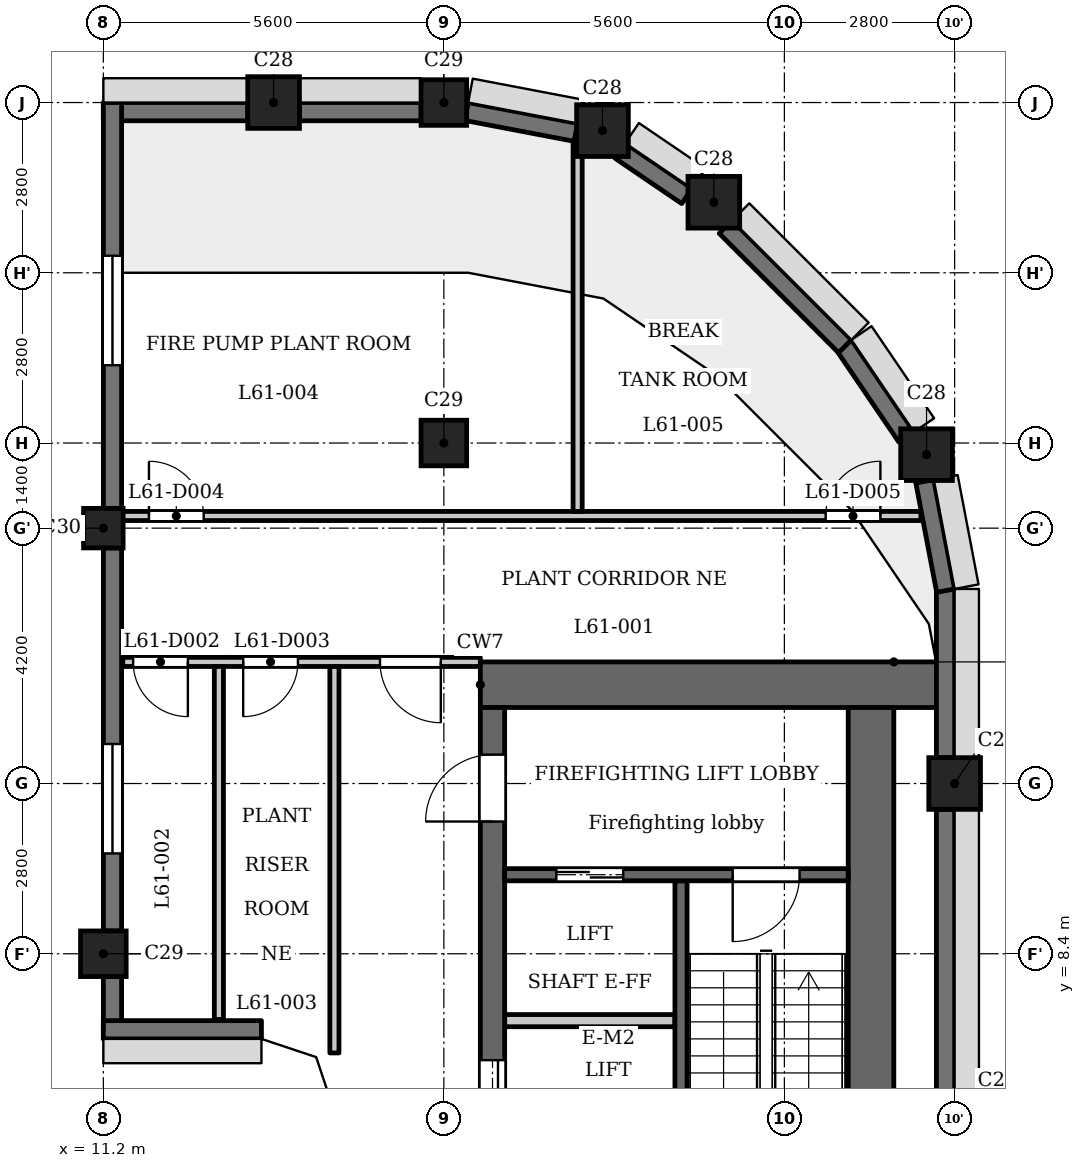
"""IFC4 building model, lengths in metres.
Left out: names, types, materials, properties, quantities, classifications, styles, units other than length and angle.
Written with IfcOpenShell. Run it as: python <this file> out.ifc"""

import sys

from ifc_helpers import new_model, si_unit, direction, frame, frame_2d, origin, origin_2d, place, context, subcontext, project, spatial, polyline, rectangle, outline, extrude, element, fill, save


model = new_model("IFC4")
c1 = context("Model", 3, precision=1e-05, world=origin(), true_north=direction((0.0, 1.0)))
c2 = subcontext(c1, "Body", "Model", "MODEL_VIEW")
j1 = project(units=[si_unit("LENGTHUNIT", "METRE"), si_unit("PLANEANGLEUNIT", "RADIAN")], contexts=[c1])
p1 = place(None, origin())
s1 = spatial("IfcSite", under=j1, at=p1, CompositionType="ELEMENT")
p2 = place(p1, origin())
s2 = spatial("IfcBuilding", under=s1, at=p2, CompositionType="ELEMENT")
p3 = place(p2, frame((0.0, 0.0, 236.3)))
s3 = spatial("IfcBuildingStorey", under=s2, at=p3, CompositionType="ELEMENT", Elevation=236.3)
for number, where, z_axis, x_axis in (
    (1, (25.2, 11.2, 0.0), (0.0, 0.0, 1.0), (1.0, 0.0, 0.0)),
    (2, (24.738, 16.609, 0.0), (0.0, 0.0, 1.0), (1.0, 0.0, 0.0)),
    (3, (21.24, 20.76, 0.0), (0.0, 0.0, 1.0), (1.0, 0.0, 0.0)),
    (4, (19.409, 21.938, 0.0), (0.0, 0.0, 1.0), (1.0, 0.0, 0.0)),
    (5, (14.0, 22.4, 0.0), (0.0, 0.0, 1.0), (1.0, 0.0, 0.0)),
):
    element("IfcColumn", number, at=place(p3, frame(where, z_axis=z_axis, x_axis=x_axis)), inside=s3, PredefinedType="COLUMN", context=c2, shape_type="SweptSolid", body=[
        extrude(rectangle(XDim=0.85, YDim=0.85, at=origin_2d()), origin(), (0.0, 0.0, 1.0), 5.4),
    ])
for number, where, z_axis, x_axis in (
    (6, (16.8, 16.8, 0.0), (0.0, 0.0, 1.0), (1.0, 0.0, 0.0)),
    (7, (16.8, 22.4, 0.0), (0.0, 0.0, 1.0), (1.0, 0.0, 0.0)),
    (8, (11.2, 8.4, 0.0), (0.0, 0.0, 1.0), (1.0, 0.0, 0.0)),
):
    element("IfcColumn", number, at=place(p3, frame(where, z_axis=z_axis, x_axis=x_axis)), inside=s3, PredefinedType="COLUMN", context=c2, shape_type="SweptSolid", body=[
        extrude(rectangle(XDim=0.75, YDim=0.75, at=origin_2d()), origin(), (0.0, 0.0, 1.0), 5.4),
    ])
p4 = place(p3, frame((11.2, 15.4, 0.0), z_axis=(0.0, 0.0, 1.0), x_axis=(1.0, 0.0, 0.0)))
e9 = element("IfcColumn", 9, at=p4, inside=s3, PredefinedType="COLUMN", context=c2, shape_type="SweptSolid", body=[
    extrude(rectangle(XDim=0.65, YDim=0.65, at=origin_2d()), origin(), (0.0, 0.0, 1.0), 5.4),
])
p5 = place(p3, frame((25.05, 6.025, 0.0), z_axis=(0.0, 0.0, 1.0), x_axis=(0.0, 1.0, 0.0)))
e10 = element("IfcWall", 10, at=p5, inside=s3, PredefinedType="SOLIDWALL", context=c2, shape_type="SweptSolid", body=[
    extrude(rectangle(XDim=4.75, YDim=0.3, at=frame_2d((2.375, 0.0))), origin(), (0.0, 0.0, 1.0), 2.6),
])
p6 = place(p3, frame((25.05, 11.625, 0.0), z_axis=(0.0, 0.0, 1.0), x_axis=(0.0, 1.0, 0.0)))
e11 = element("IfcWall", 11, at=p6, inside=s3, PredefinedType="SOLIDWALL", context=c2, shape_type="SweptSolid", body=[
    extrude(rectangle(XDim=2.775, YDim=0.3, at=frame_2d((1.387, 0.0))), origin(), (0.0, 0.0, 1.0), 2.6),
])
for number, where, z_axis, x_axis in (
    (12, (25.053, 14.372, 0.0), (0.0, 0.0, 1.0), (-0.187, 0.982, 0.0)),
    (13, (24.408, 16.898, 0.0), (0.0, 0.0, 1.0), (-0.562, 0.827, 0.0)),
):
    element("IfcWall", number, at=place(p3, frame(where, z_axis=z_axis, x_axis=x_axis)), inside=s3, PredefinedType="SOLIDWALL", context=c2, shape_type="SweptSolid", body=[
        extrude(rectangle(XDim=1.831, YDim=0.3, at=frame_2d((0.916, 0.0))), origin(), (0.0, 0.0, 1.0), 2.6),
    ])
p7 = place(p3, frame((23.397, 18.391, 0.0), z_axis=(0.0, 0.0, 1.0), x_axis=(-0.707106781187, 0.707106781187, 0.0)))
e14 = element("IfcWall", 14, at=p7, inside=s3, PredefinedType="SOLIDWALL", context=c2, shape_type="SweptSolid", body=[
    extrude(rectangle(XDim=2.775, YDim=0.3, at=frame_2d((1.388, 0.0))), origin(), (0.0, 0.0, 1.0), 2.6),
])
p8 = place(p3, frame((20.796, 20.862, 0.0), z_axis=(0.0, 0.0, 1.0), x_axis=(-0.827035970432, 0.562149004813, 0.0)))
e15 = element("IfcWall", 15, at=p8, inside=s3, PredefinedType="SOLIDWALL", context=c2, shape_type="SweptSolid", body=[
    extrude(rectangle(XDim=1.327, YDim=0.3, at=frame_2d((0.664, 0.0))), origin(), (0.0, 0.0, 1.0), 2.6),
])
p9 = place(p3, frame((18.971, 21.91, 0.0), z_axis=(0.0, 0.0, 1.0), x_axis=(-0.982300037503, 0.187314271538, 0.0)))
e16 = element("IfcWall", 16, at=p9, inside=s3, PredefinedType="SOLIDWALL", context=c2, shape_type="SweptSolid", body=[
    extrude(rectangle(XDim=1.831, YDim=0.3, at=frame_2d((0.916, 0.0))), origin(), (0.0, 0.0, 1.0), 2.6),
])
p10 = place(p3, frame((16.425, 22.25, 0.0), z_axis=(0.0, 0.0, 1.0), x_axis=(-1.0, 0.0, 0.0)))
e17 = element("IfcWall", 17, at=p10, inside=s3, PredefinedType="SOLIDWALL", context=c2, shape_type="SweptSolid", body=[
    extrude(rectangle(XDim=2.0, YDim=0.3, at=frame_2d((1.0, 0.0))), origin(), (0.0, 0.0, 1.0), 2.6),
])
p11 = place(p3, frame((13.575, 22.25, 0.0), z_axis=(0.0, 0.0, 1.0), x_axis=(-1.0, 0.0, 0.0)))
e18 = element("IfcWall", 18, at=p11, inside=s3, PredefinedType="SOLIDWALL", context=c2, shape_type="SweptSolid", body=[
    extrude(rectangle(XDim=2.375, YDim=0.3, at=frame_2d((1.188, 0.0))), origin(), (0.0, 0.0, 1.0), 4.6),
])
p12 = place(p3, frame((11.35, 22.4, 0.0), z_axis=(0.0, 0.0, 1.0), x_axis=(0.0, -1.0, 0.0)))
e19 = element("IfcWall", 19, at=p12, inside=s3, PredefinedType="SOLIDWALL", context=c2, shape_type="SweptSolid", body=[
    extrude(rectangle(XDim=6.675, YDim=0.3, at=frame_2d((3.337, 0.0))), origin(), (0.0, 0.0, 1.0), 4.6),
])
p13 = place(p12, frame((2.52, 0.0, 0.9)))
e20 = element("IfcOpeningElement", 20, at=p13, cuts=e19, PredefinedType="OPENING", context=c2, shape_type="SweptSolid", body=[
    extrude(rectangle(XDim=1.8, YDim=1.5, at=frame_2d((0.9, 0.75))), frame((0.0, 0.16, 0.0), z_axis=(0.0, -1.0, 0.0), x_axis=(1.0, 0.0, 0.0)), (0.0, 0.0, 1.0), 0.32),
])
p14 = place(p3, frame((11.35, 15.075, 0.0), z_axis=(0.0, 0.0, 1.0), x_axis=(0.0, -1.0, 0.0)))
e21 = element("IfcWall", 21, at=p14, inside=s3, PredefinedType="SOLIDWALL", context=c2, shape_type="SweptSolid", body=[
    extrude(rectangle(XDim=6.3, YDim=0.3, at=frame_2d((3.15, 0.0))), origin(), (0.0, 0.0, 1.0), 4.6),
])
p15 = place(p14, frame((3.225, 0.0, 0.9)))
e22 = element("IfcOpeningElement", 22, at=p15, cuts=e21, PredefinedType="OPENING", context=c2, shape_type="SweptSolid", body=[
    extrude(rectangle(XDim=1.8, YDim=1.5, at=frame_2d((0.9, 0.75))), frame((0.0, 0.16, 0.0), z_axis=(0.0, -1.0, 0.0), x_axis=(1.0, 0.0, 0.0)), (0.0, 0.0, 1.0), 0.32),
])
p16 = place(p3, frame((11.35, 8.025, 0.0), z_axis=(0.0, 0.0, 1.0), x_axis=(0.0, -1.0, 0.0)))
e23 = element("IfcWall", 23, at=p16, inside=s3, PredefinedType="SOLIDWALL", context=c2, shape_type="SweptSolid", body=[
    extrude(rectangle(XDim=1.025, YDim=0.3, at=frame_2d((0.512, 0.0))), origin(), (0.0, 0.0, 1.0), 4.6),
])
p17 = place(p3, frame((11.2, 7.15, 0.0), z_axis=(0.0, 0.0, 1.0), x_axis=(1.0, 0.0, 0.0)))
e24 = element("IfcWall", 24, at=p17, inside=s3, PredefinedType="SOLIDWALL", context=c2, shape_type="SweptSolid", body=[
    extrude(rectangle(XDim=2.6, YDim=0.3, at=frame_2d((1.3, 0.0))), origin(), (0.0, 0.0, 1.0), 4.6),
])
p18 = place(p3, frame((20.7, 2.6, 0.0), z_axis=(0.0, 0.0, 1.0), x_axis=(0.0, 1.0, 0.0)))
e25 = element("IfcWall", 25, at=p18, inside=s3, PredefinedType="SHEAR", context=c2, shape_type="SweptSolid", body=[
    extrude(rectangle(XDim=7.0, YDim=0.2, at=frame_2d((3.5, 0.0))), origin(), (0.0, 0.0, 1.0), 4.6),
])
p19 = place(p3, frame((17.4, 12.825, 0.0), z_axis=(0.0, 0.0, 1.0), x_axis=(1.0, 0.0, 0.0)))
e26 = element("IfcWall", 26, at=p19, inside=s3, PredefinedType="SHEAR", context=c2, shape_type="SweptSolid", body=[
    extrude(rectangle(XDim=7.6, YDim=0.75, at=frame_2d((3.8, 0.0))), origin(), (0.0, 0.0, 1.0), 4.6),
])
p20 = place(p3, frame((17.6, -12.45, 0.0), z_axis=(0.0, 0.0, 1.0), x_axis=(0.0, 1.0, 0.0)))
e27 = element("IfcWall", 27, at=p20, inside=s3, PredefinedType="SHEAR", context=c2, shape_type="SweptSolid", body=[
    extrude(rectangle(XDim=24.9, YDim=0.4, at=frame_2d((12.45, 0.0))), origin(), (0.0, 0.0, 1.0), 4.6),
])
p21 = place(p20, frame((11.05, 0.0, 0.0)))
e28 = element("IfcOpeningElement", 28, at=p21, cuts=e27, PredefinedType="OPENING", context=c2, shape_type="SweptSolid", body=[
    extrude(rectangle(XDim=0.9, YDim=2.1, at=frame_2d((0.45, 1.05))), frame((0.0, 0.21, 0.0), z_axis=(0.0, -1.0, 0.0), x_axis=(1.0, 0.0, 0.0)), (0.0, 0.0, 1.0), 0.42),
])
p22 = place(p20, frame((15.6, 0.0, 0.0)))
e29 = element("IfcOpeningElement", 29, at=p22, cuts=e27, PredefinedType="OPENING", context=c2, shape_type="SweptSolid", body=[
    extrude(rectangle(XDim=1.1, YDim=2.1, at=frame_2d((0.55, 1.05))), frame((0.0, 0.21, 0.0), z_axis=(0.0, -1.0, 0.0), x_axis=(1.0, 0.0, 0.0)), (0.0, 0.0, 1.0), 0.42),
])
p23 = place(p20, frame((18.0, 0.0, 0.0)))
e30 = element("IfcOpeningElement", 30, at=p23, cuts=e27, PredefinedType="OPENING", context=c2, shape_type="SweptSolid", body=[
    extrude(rectangle(XDim=1.1, YDim=2.1, at=frame_2d((0.55, 1.05))), frame((0.0, 0.21, 0.0), z_axis=(0.0, -1.0, 0.0), x_axis=(1.0, 0.0, 0.0)), (0.0, 0.0, 1.0), 0.42),
])
p24 = place(p20, frame((23.025, 0.0, 0.0)))
e31 = element("IfcOpeningElement", 31, at=p24, cuts=e27, PredefinedType="OPENING", context=c2, shape_type="SweptSolid", body=[
    extrude(rectangle(XDim=1.1, YDim=2.1, at=frame_2d((0.55, 1.05))), frame((0.0, 0.21, 0.0), z_axis=(0.0, -1.0, 0.0), x_axis=(1.0, 0.0, 0.0)), (0.0, 0.0, 1.0), 0.42),
])
p25 = place(p20, frame((0.775, 0.0, 0.0)))
e32 = element("IfcOpeningElement", 32, at=p25, cuts=e27, PredefinedType="OPENING", context=c2, shape_type="SweptSolid", body=[
    extrude(rectangle(XDim=1.1, YDim=2.1, at=frame_2d((0.55, 1.05))), frame((0.0, 0.21, 0.0), z_axis=(0.0, -1.0, 0.0), x_axis=(1.0, 0.0, 0.0)), (0.0, 0.0, 1.0), 0.42),
])
p26 = place(p20, frame((12.925, 0.0, 0.0)))
e33 = element("IfcOpeningElement", 33, at=p26, cuts=e27, PredefinedType="OPENING", context=c2, shape_type="SweptSolid", body=[
    extrude(rectangle(XDim=1.8, YDim=2.1, at=frame_2d((0.9, 1.05))), frame((0.0, 0.21, 0.0), z_axis=(0.0, -1.0, 0.0), x_axis=(1.0, 0.0, 0.0)), (0.0, 0.0, 1.0), 0.42),
])
p27 = place(p3, frame((23.825, -12.45, 0.0), z_axis=(0.0, 0.0, 1.0), x_axis=(0.0, 1.0, 0.0)))
e34 = element("IfcWall", 34, at=p27, inside=s3, PredefinedType="SHEAR", context=c2, shape_type="SweptSolid", body=[
    extrude(rectangle(XDim=24.9, YDim=0.75, at=frame_2d((12.45, 0.0))), origin(), (0.0, 0.0, 1.0), 4.6),
])
p28 = place(p3, frame((17.8, 7.3, 0.0), z_axis=(0.0, 0.0, 1.0), x_axis=(1.0, 0.0, 0.0)))
e35 = element("IfcWall", 35, at=p28, inside=s3, PredefinedType="PARTITIONING", context=c2, shape_type="SweptSolid", body=[
    extrude(rectangle(XDim=2.8, YDim=0.2, at=frame_2d((1.4, 0.0))), origin(), (0.0, 0.0, 1.0), 4.6),
])
p29 = place(p3, frame((17.8, 9.7, 0.0), z_axis=(0.0, 0.0, 1.0), x_axis=(1.0, 0.0, 0.0)))
e36 = element("IfcWall", 36, at=p29, inside=s3, PredefinedType="SHEAR", context=c2, shape_type="SweptSolid", body=[
    extrude(rectangle(XDim=5.65, YDim=0.2, at=frame_2d((2.825, 0.0))), origin(), (0.0, 0.0, 1.0), 4.6),
])
p30 = place(p29, frame((0.85, 0.0, 0.0)))
e37 = element("IfcOpeningElement", 37, at=p30, cuts=e36, PredefinedType="OPENING", context=c2, shape_type="SweptSolid", body=[
    extrude(rectangle(XDim=1.1, YDim=2.1, at=frame_2d((0.55, 1.05))), frame((0.0, 0.11, 0.0), z_axis=(0.0, -1.0, 0.0), x_axis=(1.0, 0.0, 0.0)), (0.0, 0.0, 1.0), 0.22),
])
p31 = place(p29, frame((3.75, 0.0, 0.0)))
e38 = element("IfcOpeningElement", 38, at=p31, cuts=e36, PredefinedType="OPENING", context=c2, shape_type="SweptSolid", body=[
    extrude(rectangle(XDim=1.1, YDim=2.1, at=frame_2d((0.55, 1.05))), frame((0.0, 0.11, 0.0), z_axis=(0.0, -1.0, 0.0), x_axis=(1.0, 0.0, 0.0)), (0.0, 0.0, 1.0), 0.22),
])
p32 = place(p3, frame((11.52, 13.2, 0.0), z_axis=(0.0, 0.0, 1.0), x_axis=(1.0, 0.0, 0.0)))
e39 = element("IfcWall", 39, at=p32, inside=s3, PredefinedType="PARTITIONING", context=c2, shape_type="SweptSolid", body=[
    extrude(rectangle(XDim=5.88, YDim=0.15, at=frame_2d((2.94, 0.0))), origin(), (0.0, 0.0, 1.0), 4.6),
])
p33 = place(p32, frame((4.23, 0.0, 0.0)))
e40 = element("IfcOpeningElement", 40, at=p33, cuts=e39, PredefinedType="OPENING", context=c2, shape_type="SweptSolid", body=[
    extrude(rectangle(XDim=1.0, YDim=2.1, at=frame_2d((0.5, 1.05))), frame((0.0, 0.085, 0.0), z_axis=(0.0, -1.0, 0.0), x_axis=(1.0, 0.0, 0.0)), (0.0, 0.0, 1.0), 0.17),
])
p34 = place(p32, frame((0.17, 0.0, 0.0)))
e41 = element("IfcOpeningElement", 41, at=p34, cuts=e39, PredefinedType="OPENING", context=c2, shape_type="SweptSolid", body=[
    extrude(rectangle(XDim=0.9, YDim=2.1, at=frame_2d((0.45, 1.05))), frame((0.0, 0.085, 0.0), z_axis=(0.0, -1.0, 0.0), x_axis=(1.0, 0.0, 0.0)), (0.0, 0.0, 1.0), 0.17),
])
p35 = place(p32, frame((1.98, 0.0, 0.0)))
e42 = element("IfcOpeningElement", 42, at=p35, cuts=e39, PredefinedType="OPENING", context=c2, shape_type="SweptSolid", body=[
    extrude(rectangle(XDim=0.9, YDim=2.1, at=frame_2d((0.45, 1.05))), frame((0.0, 0.085, 0.0), z_axis=(0.0, -1.0, 0.0), x_axis=(1.0, 0.0, 0.0)), (0.0, 0.0, 1.0), 0.17),
])
p36 = place(p3, frame((11.29, 15.6, 0.0), z_axis=(0.0, 0.0, 1.0), x_axis=(1.0, 0.0, 0.0)))
e43 = element("IfcWall", 43, at=p36, inside=s3, PredefinedType="PARTITIONING", context=c2, shape_type="SweptSolid", body=[
    extrude(rectangle(XDim=13.356, YDim=0.15, at=frame_2d((6.678, 0.0))), origin(), (0.0, 0.0, 1.0), 4.6),
])
p37 = place(p36, frame((0.66, 0.0, 0.0)))
e44 = element("IfcOpeningElement", 44, at=p37, cuts=e43, PredefinedType="OPENING", context=c2, shape_type="SweptSolid", body=[
    extrude(rectangle(XDim=0.9, YDim=2.1, at=frame_2d((0.45, 1.05))), frame((0.0, 0.085, 0.0), z_axis=(0.0, -1.0, 0.0), x_axis=(1.0, 0.0, 0.0)), (0.0, 0.0, 1.0), 0.17),
])
p38 = place(p36, frame((11.789, 0.0, 0.0)))
e45 = element("IfcOpeningElement", 45, at=p38, cuts=e43, PredefinedType="OPENING", context=c2, shape_type="SweptSolid", body=[
    extrude(rectangle(XDim=0.9, YDim=2.1, at=frame_2d((0.45, 1.05))), frame((0.0, 0.085, 0.0), z_axis=(0.0, -1.0, 0.0), x_axis=(1.0, 0.0, 0.0)), (0.0, 0.0, 1.0), 0.17),
])
p39 = place(p3, frame((13.1, 7.32, 0.0), z_axis=(0.0, 0.0, 1.0), x_axis=(0.0, 1.0, 0.0)))
e46 = element("IfcWall", 46, at=p39, inside=s3, PredefinedType="PARTITIONING", context=c2, shape_type="SweptSolid", body=[
    extrude(rectangle(XDim=5.805, YDim=0.15, at=frame_2d((2.902, 0.0))), origin(), (0.0, 0.0, 1.0), 4.6),
])
p40 = place(p3, frame((15.0, 6.769, 0.0), z_axis=(0.0, 0.0, 1.0), x_axis=(0.0, 1.0, 0.0)))
e47 = element("IfcWall", 47, at=p40, inside=s3, PredefinedType="PARTITIONING", context=c2, shape_type="SweptSolid", body=[
    extrude(rectangle(XDim=6.356, YDim=0.15, at=frame_2d((3.178, 0.0))), origin(), (0.0, 0.0, 1.0), 4.6),
])
p41 = place(p3, frame((19.0, 15.675, 0.0), z_axis=(0.0, 0.0, 1.0), x_axis=(0.0, 1.0, 0.0)))
e48 = element("IfcWall", 48, at=p41, inside=s3, PredefinedType="PARTITIONING", context=c2, shape_type="SweptSolid", body=[
    extrude(rectangle(XDim=6.285, YDim=0.15, at=frame_2d((3.143, 0.0))), origin(), (0.0, 0.0, 1.0), 4.6),
])
p42 = place(p3, origin())
e49 = element("IfcWall", 49, at=p42, inside=s3, PredefinedType="SOLIDWALL", context=c2, shape_type="SweptSolid", body=[
    extrude(outline(polyline([(13.8, 7.0), (14.7, 6.7), (15.0, 5.8), (15.3, 5.8), (15.3, 5.849), (14.937, 6.937), (13.849, 7.3), (13.8, 7.3), (13.8, 7.0)])), origin(), (0.0, 0.0, 1.0), 4.6),
])
p43 = place(p23, origin())
e50 = element("IfcDoor", 50, at=p43, inside=s3, OperationType="DOUBLE_DOOR_SLIDING", PredefinedType="DOOR", context=c2, shape_type="SweptSolid", body=[
    extrude(rectangle(XDim=1.1, YDim=2.1, at=frame_2d((0.55, 1.05))), frame((0.0, 0.025, 0.0), z_axis=(0.0, -1.0, 0.0), x_axis=(1.0, 0.0, 0.0)), (0.0, 0.0, 1.0), 0.05),
])
fill(e30, e50)
p44 = place(p30, origin())
e51 = element("IfcDoor", 51, at=p44, inside=s3, OperationType="DOUBLE_DOOR_SLIDING", PredefinedType="DOOR", context=c2, shape_type="SweptSolid", body=[
    extrude(rectangle(XDim=1.1, YDim=2.1, at=frame_2d((0.55, 1.05))), frame((0.0, 0.025, 0.0), z_axis=(0.0, -1.0, 0.0), x_axis=(1.0, 0.0, 0.0)), (0.0, 0.0, 1.0), 0.05),
])
fill(e37, e51)
p45 = place(p24, origin())
e52 = element("IfcDoor", 52, at=p45, inside=s3, OperationType="SINGLE_SWING_RIGHT", PredefinedType="DOOR", context=c2, shape_type="SweptSolid", body=[
    extrude(rectangle(XDim=1.1, YDim=2.1, at=frame_2d((0.55, 1.05))), frame((0.0, 0.025, 0.0), z_axis=(0.0, -1.0, 0.0), x_axis=(1.0, 0.0, 0.0)), (0.0, 0.0, 1.0), 0.05),
])
fill(e31, e52)
p46 = place(p31, origin())
e53 = element("IfcDoor", 53, at=p46, inside=s3, OperationType="SINGLE_SWING_LEFT", PredefinedType="DOOR", context=c2, shape_type="SweptSolid", body=[
    extrude(rectangle(XDim=1.1, YDim=2.1, at=frame_2d((0.55, 1.05))), frame((0.0, 0.025, 0.0), z_axis=(0.0, -1.0, 0.0), x_axis=(1.0, 0.0, 0.0)), (0.0, 0.0, 1.0), 0.05),
])
fill(e38, e53)
p47 = place(p33, origin())
e54 = element("IfcDoor", 54, at=p47, inside=s3, OperationType="SINGLE_SWING_RIGHT", PredefinedType="DOOR", context=c2, shape_type="SweptSolid", body=[
    extrude(rectangle(XDim=1.0, YDim=2.1, at=frame_2d((0.5, 1.05))), frame((0.0, 0.025, 0.0), z_axis=(0.0, -1.0, 0.0), x_axis=(1.0, 0.0, 0.0)), (0.0, 0.0, 1.0), 0.05),
])
fill(e40, e54)
p48 = place(p34, origin())
e55 = element("IfcDoor", 55, at=p48, inside=s3, OperationType="SINGLE_SWING_RIGHT", PredefinedType="DOOR", context=c2, shape_type="SweptSolid", body=[
    extrude(rectangle(XDim=0.9, YDim=2.1, at=frame_2d((0.45, 1.05))), frame((0.0, 0.025, 0.0), z_axis=(0.0, -1.0, 0.0), x_axis=(1.0, 0.0, 0.0)), (0.0, 0.0, 1.0), 0.05),
])
fill(e41, e55)
p49 = place(p35, origin())
e56 = element("IfcDoor", 56, at=p49, inside=s3, OperationType="SINGLE_SWING_LEFT", PredefinedType="DOOR", context=c2, shape_type="SweptSolid", body=[
    extrude(rectangle(XDim=0.9, YDim=2.1, at=frame_2d((0.45, 1.05))), frame((0.0, 0.025, 0.0), z_axis=(0.0, -1.0, 0.0), x_axis=(1.0, 0.0, 0.0)), (0.0, 0.0, 1.0), 0.05),
])
fill(e42, e56)
p50 = place(p37, origin())
e57 = element("IfcDoor", 57, at=p50, inside=s3, OperationType="SINGLE_SWING_RIGHT", PredefinedType="DOOR", context=c2, shape_type="SweptSolid", body=[
    extrude(rectangle(XDim=0.9, YDim=2.1, at=frame_2d((0.45, 1.05))), frame((0.0, 0.025, 0.0), z_axis=(0.0, -1.0, 0.0), x_axis=(1.0, 0.0, 0.0)), (0.0, 0.0, 1.0), 0.05),
])
fill(e44, e57)
p51 = place(p38, origin())
e58 = element("IfcDoor", 58, at=p51, inside=s3, OperationType="SINGLE_SWING_LEFT", PredefinedType="DOOR", context=c2, shape_type="SweptSolid", body=[
    extrude(rectangle(XDim=0.9, YDim=2.1, at=frame_2d((0.45, 1.05))), frame((0.0, 0.025, 0.0), z_axis=(0.0, -1.0, 0.0), x_axis=(1.0, 0.0, 0.0)), (0.0, 0.0, 1.0), 0.05),
])
fill(e45, e58)
p52 = place(p13, origin())
e59 = element("IfcWindow", 59, at=p52, inside=s3, PartitioningType="SINGLE_PANEL", PredefinedType="WINDOW", context=c2, shape_type="SweptSolid", body=[
    extrude(rectangle(XDim=1.8, YDim=1.5, at=frame_2d((0.9, 0.75))), frame((0.0, 0.03, 0.0), z_axis=(0.0, -1.0, 0.0), x_axis=(1.0, 0.0, 0.0)), (0.0, 0.0, 1.0), 0.06),
])
fill(e20, e59)
p53 = place(p15, origin())
e60 = element("IfcWindow", 60, at=p53, inside=s3, PartitioningType="SINGLE_PANEL", PredefinedType="WINDOW", context=c2, shape_type="SweptSolid", body=[
    extrude(rectangle(XDim=1.8, YDim=1.5, at=frame_2d((0.9, 0.75))), frame((0.0, 0.03, 0.0), z_axis=(0.0, -1.0, 0.0), x_axis=(1.0, 0.0, 0.0)), (0.0, 0.0, 1.0), 0.06),
])
fill(e22, e60)
save(model, sys.argv[1])
